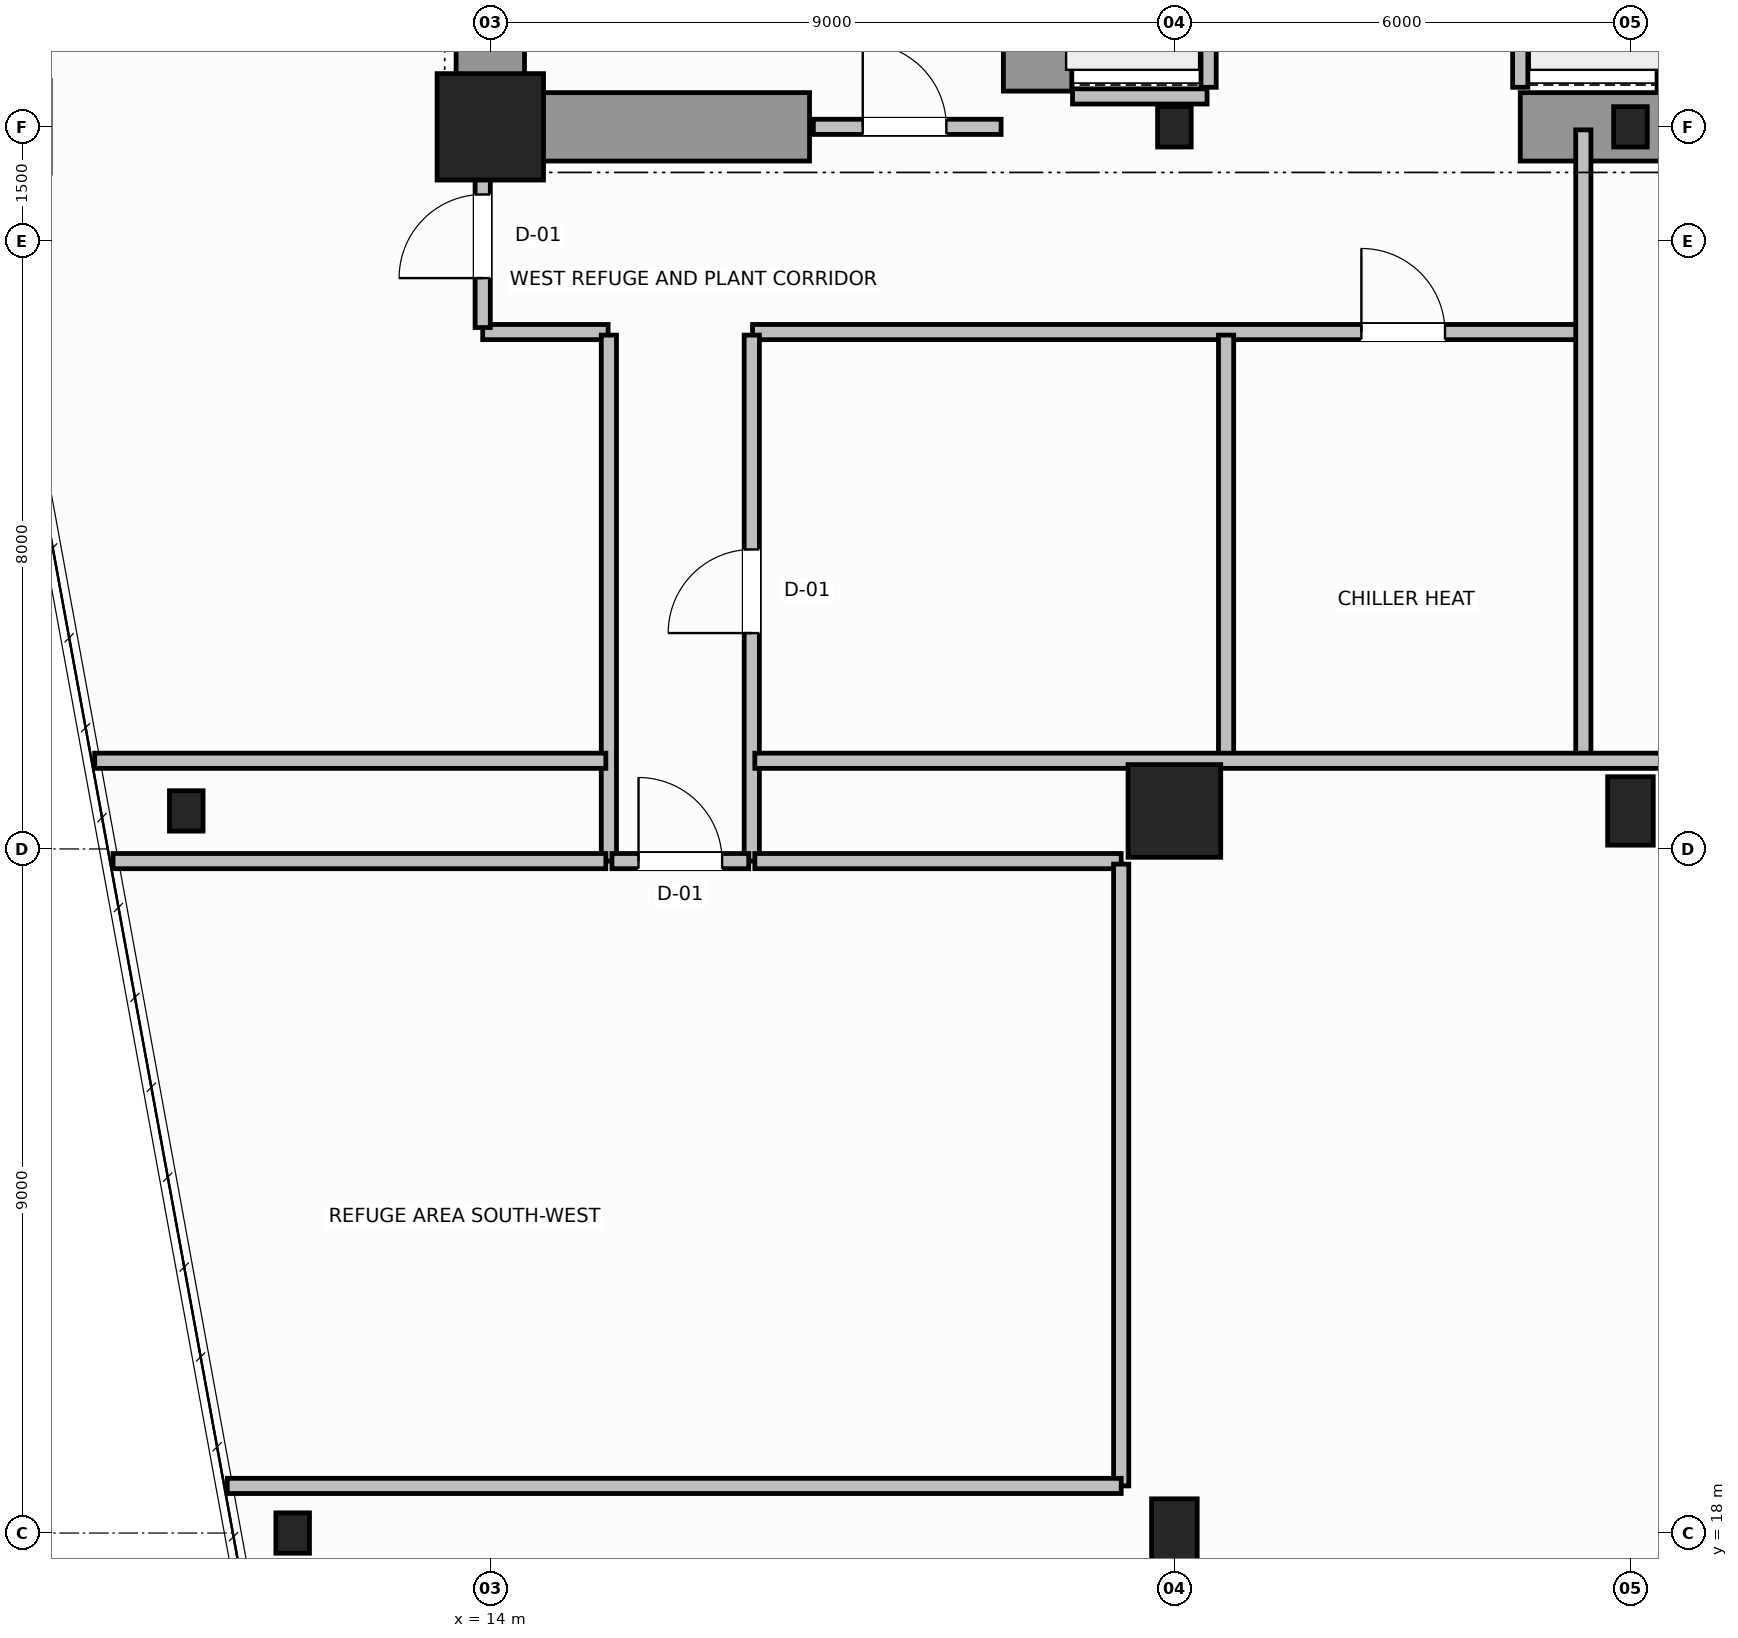
"""IFC4 building model, lengths in metres.
Left out: names, types, materials, properties, quantities, classifications, styles, units other than length and angle.
Written with IfcOpenShell. Run it as: python <this file> out.ifc"""

import sys

from ifc_helpers import new_model, si_unit, direction, frame, frame_2d, origin, origin_2d, place, context, subcontext, project, spatial, rectangle, hollow_rectangle, hollow_circle, i_section, extrude, source, transform, mapped, element, fill, save


model = new_model("IFC4")
c1 = context("Model", 3, precision=1e-05, world=origin(), true_north=direction((0.0, 1.0)))
c2 = subcontext(c1, "Body", "Model", "MODEL_VIEW")
j1 = project(units=[si_unit("LENGTHUNIT", "METRE"), si_unit("PLANEANGLEUNIT", "RADIAN")], contexts=[c1])
p1 = place(None, origin())
s1 = spatial("IfcSite", under=j1, at=p1, CompositionType="ELEMENT")
p2 = place(p1, origin())
s2 = spatial("IfcBuilding", under=s1, at=p2, CompositionType="ELEMENT")
p3 = place(p2, frame((0.0, 0.0, 83.4)))
s3 = spatial("IfcBuildingStorey", under=s2, at=p3, CompositionType="ELEMENT", Elevation=83.4)
m1 = source(origin(), c2, "Body", "SweptSolid", [
    extrude(rectangle(XDim=1.4, YDim=1.4, at=origin_2d()), origin(), (0.0, 0.0, 1.0), 4.8),
])
p4 = place(p3, frame((14.0, 36.5, 0.0), z_axis=(0.0, 0.0, 1.0), x_axis=(1.0, 0.0, 0.0)))
e1 = element("IfcColumn", 1, at=p4, inside=s3, PredefinedType="COLUMN", context=c2, shape_type="MappedRepresentation", body=[
    mapped(m1, transform((0.0, 0.0, 0.0), scale=1.0)),
])
m2 = source(origin(), c2, "Body", "SweptSolid", [
    extrude(i_section(OverallWidth=0.442, OverallDepth=0.531, WebThickness=0.065, FlangeThickness=0.076, FilletRadius=0.015, at=origin_2d()), origin(), (0.0, 0.0, 1.0), 4.8),
])
for number, where, z_axis, x_axis in (
    (2, (23.0, 36.5, 0.0), (0.0, 0.0, 1.0), (1.0, 0.0, 0.0)),
    (3, (29.0, 36.5, 0.0), (0.0, 0.0, 1.0), (1.0, 0.0, 0.0)),
):
    element("IfcColumn", number, at=place(p3, frame(where, z_axis=z_axis, x_axis=x_axis)), inside=s3, PredefinedType="COLUMN", context=c2, shape_type="MappedRepresentation", body=[
        mapped(m2, transform((0.0, 0.0, 0.0), scale=1.0)),
    ])
m3 = source(origin(), c2, "Body", "SweptSolid", [
    extrude(i_section(OverallWidth=0.442, OverallDepth=0.531, WebThickness=0.065, FlangeThickness=0.076, FilletRadius=0.015, at=origin_2d()), origin(), (0.0, 0.0, 1.0), 4.8),
])
for number, where, z_axis, x_axis in (
    (4, (10.0, 27.5, 0.0), (0.0, 0.0, 1.0), (1.0, 0.0, 0.0)),
    (5, (11.4, 18.0, 0.0), (0.0, 0.0, 1.0), (1.0, 0.0, 0.0)),
):
    element("IfcColumn", number, at=place(p3, frame(where, z_axis=z_axis, x_axis=x_axis)), inside=s3, PredefinedType="COLUMN", context=c2, shape_type="MappedRepresentation", body=[
        mapped(m3, transform((0.0, 0.0, 0.0), scale=1.0)),
    ])
m4 = source(origin(), c2, "Body", "SweptSolid", [
    extrude(hollow_circle(Radius=0.61, WallThickness=0.05, at=origin_2d()), origin(), (0.0, 0.0, 1.0), 4.8),
])
p5 = place(p3, frame((23.0, 27.5, 0.0), z_axis=(0.0, 0.0, 1.0), x_axis=(1.0, 0.0, 0.0)))
e6 = element("IfcColumn", 6, at=p5, inside=s3, PredefinedType="COLUMN", context=c2, shape_type="MappedRepresentation", body=[
    mapped(m4, transform((0.0, 0.0, 0.0), scale=1.0)),
])
m5 = source(origin(), c2, "Body", "SweptSolid", [
    extrude(hollow_rectangle(XDim=0.6, YDim=0.9, WallThickness=0.04, InnerFilletRadius=0.04, OuterFilletRadius=0.08, at=origin_2d()), origin(), (0.0, 0.0, 1.0), 4.8),
])
for number, where, z_axis, x_axis in (
    (7, (29.0, 27.5, 0.0), (0.0, 0.0, 1.0), (1.0, 0.0, 0.0)),
    (8, (23.0, 18.0, 0.0), (0.0, 0.0, 1.0), (1.0, 0.0, 0.0)),
):
    element("IfcColumn", number, at=place(p3, frame(where, z_axis=z_axis, x_axis=x_axis)), inside=s3, PredefinedType="COLUMN", context=c2, shape_type="MappedRepresentation", body=[
        mapped(m5, transform((0.0, 0.0, 0.0), scale=1.0)),
    ])
p6 = place(p3, frame((14.0, 36.5, 0.0), z_axis=(0.0, 0.0, 1.0), x_axis=(0.0, 1.0, 0.0)))
e9 = element("IfcWall", 9, at=p6, inside=s3, PredefinedType="SHEAR", context=c2, shape_type="SweptSolid", body=[
    extrude(rectangle(XDim=14.5, YDim=0.9, at=frame_2d((7.25, 0.0))), origin(), (0.0, 0.0, 1.0), 4.8),
])
p7 = place(p3, frame((14.47, 36.5, 0.0), z_axis=(0.0, 0.0, 1.0), x_axis=(1.0, 0.0, 0.0)))
e10 = element("IfcWall", 10, at=p7, inside=s3, PredefinedType="SHEAR", context=c2, shape_type="SweptSolid", body=[
    extrude(rectangle(XDim=3.73, YDim=0.9, at=frame_2d((1.865, 0.0))), origin(), (0.0, 0.0, 1.0), 3.34),
])
p8 = place(p3, frame((27.55, 36.5, 0.0), z_axis=(0.0, 0.0, 1.0), x_axis=(1.0, 0.0, 0.0)))
e11 = element("IfcWall", 11, at=p8, inside=s3, PredefinedType="SHEAR", context=c2, shape_type="SweptSolid", body=[
    extrude(rectangle(XDim=4.5, YDim=0.9, at=frame_2d((2.25, 0.0))), origin(), (0.0, 0.0, 1.0), 4.8),
])
p9 = place(p3, frame((21.2, 36.97, 0.0), z_axis=(0.0, 0.0, 1.0), x_axis=(0.0, 1.0, 0.0)))
e12 = element("IfcWall", 12, at=p9, inside=s3, PredefinedType="SHEAR", context=c2, shape_type="SweptSolid", body=[
    extrude(rectangle(XDim=9.23, YDim=0.9, at=frame_2d((4.615, 0.0))), origin(), (0.0, 0.0, 1.0), 4.8),
])
p10 = place(p3, frame((29.8, 36.97, 0.0), z_axis=(0.0, 0.0, 1.0), x_axis=(0.0, 1.0, 0.0)))
e13 = element("IfcWall", 13, at=p10, inside=s3, PredefinedType="SHEAR", context=c2, shape_type="SweptSolid", body=[
    extrude(rectangle(XDim=9.23, YDim=0.9, at=frame_2d((4.615, 0.0))), origin(), (0.0, 0.0, 1.0), 4.8),
])
p11 = place(p10, frame((4.05, 0.0, 0.0)))
e14 = element("IfcOpeningElement", 14, at=p11, cuts=e13, PredefinedType="OPENING", context=c2, shape_type="SweptSolid", body=[
    extrude(rectangle(XDim=1.1, YDim=2.15, at=frame_2d((0.55, 1.075))), frame((0.0, 0.46, 0.0), z_axis=(0.0, -1.0, 0.0), x_axis=(1.0, 0.0, 0.0)), (0.0, 0.0, 1.0), 0.92),
])
p12 = place(p3, frame((18.25, 36.5, 0.0), z_axis=(0.0, 0.0, 1.0), x_axis=(1.0, 0.0, 0.0)))
e15 = element("IfcWall", 15, at=p12, inside=s3, PredefinedType="SOLIDWALL", context=c2, shape_type="SweptSolid", body=[
    extrude(rectangle(XDim=2.47, YDim=0.2, at=frame_2d((1.235, 0.0))), origin(), (0.0, 0.0, 1.0), 3.33),
])
p13 = place(p12, frame((0.65, 0.0, 0.0)))
e16 = element("IfcOpeningElement", 16, at=p13, cuts=e15, PredefinedType="OPENING", context=c2, shape_type="SweptSolid", body=[
    extrude(rectangle(XDim=1.1, YDim=2.15, at=frame_2d((0.55, 1.075))), frame((0.0, 0.11, 0.0), z_axis=(0.0, -1.0, 0.0), x_axis=(1.0, 0.0, 0.0)), (0.0, 0.0, 1.0), 0.22),
])
p14 = place(p3, frame((21.66, 36.9, 0.0), z_axis=(0.0, 0.0, 1.0), x_axis=(1.0, 0.0, 0.0)))
e17 = element("IfcWall", 17, at=p14, inside=s3, PredefinedType="SOLIDWALL", context=c2, shape_type="SweptSolid", body=[
    extrude(rectangle(XDim=1.77, YDim=0.2, at=frame_2d((0.885, 0.0))), origin(), (0.0, 0.0, 1.0), 3.33),
])
for number, where, z_axis, x_axis in (
    (18, (23.45, 37.02, 0.0), (0.0, 0.0, 1.0), (0.0, 1.0, 0.0)),
    (19, (27.55, 37.02, 0.0), (0.0, 0.0, 1.0), (0.0, 1.0, 0.0)),
):
    element("IfcWall", number, at=place(p3, frame(where, z_axis=z_axis, x_axis=x_axis)), inside=s3, PredefinedType="SOLIDWALL", context=c2, shape_type="SweptSolid", body=[
        extrude(rectangle(XDim=2.56, YDim=0.2, at=frame_2d((1.28, 0.0))), origin(), (0.0, 0.0, 1.0), 4.54),
    ])
p15 = place(p3, frame((13.9, 33.8, 0.0), z_axis=(0.0, 0.0, 1.0), x_axis=(1.0, 0.0, 0.0)))
e20 = element("IfcWall", 20, at=p15, inside=s3, PredefinedType="SOLIDWALL", context=c2, shape_type="SweptSolid", body=[
    extrude(rectangle(XDim=1.65, YDim=0.2, at=frame_2d((0.825, 0.0))), origin(), (0.0, 0.0, 1.0), 4.03),
])
p16 = place(p3, frame((17.45, 33.8, 0.0), z_axis=(0.0, 0.0, 1.0), x_axis=(1.0, 0.0, 0.0)))
e21 = element("IfcWall", 21, at=p16, inside=s3, PredefinedType="SOLIDWALL", context=c2, shape_type="SweptSolid", body=[
    extrude(rectangle(XDim=10.91, YDim=0.2, at=frame_2d((5.455, 0.0))), origin(), (0.0, 0.0, 1.0), 4.03),
])
p17 = place(p16, frame((8.01, 0.0, 0.0)))
e22 = element("IfcOpeningElement", 22, at=p17, cuts=e21, PredefinedType="OPENING", context=c2, shape_type="SweptSolid", body=[
    extrude(rectangle(XDim=1.1, YDim=2.15, at=frame_2d((0.55, 1.075))), frame((0.0, 0.11, 0.0), z_axis=(0.0, -1.0, 0.0), x_axis=(1.0, 0.0, 0.0)), (0.0, 0.0, 1.0), 0.22),
])
p18 = place(p3, frame((13.9, 33.86, 0.0), z_axis=(0.0, 0.0, 1.0), x_axis=(0.0, 1.0, 0.0)))
e23 = element("IfcWall", 23, at=p18, inside=s3, PredefinedType="SOLIDWALL", context=c2, shape_type="SweptSolid", body=[
    extrude(rectangle(XDim=2.58, YDim=0.2, at=frame_2d((1.29, 0.0))), origin(), (0.0, 0.0, 1.0), 4.54),
])
p19 = place(p18, frame((0.65, 0.0, 0.0)))
e24 = element("IfcOpeningElement", 24, at=p19, cuts=e23, PredefinedType="OPENING", context=c2, shape_type="SweptSolid", body=[
    extrude(rectangle(XDim=1.1, YDim=2.15, at=frame_2d((0.55, 1.075))), frame((0.0, 0.11, 0.0), z_axis=(0.0, -1.0, 0.0), x_axis=(1.0, 0.0, 0.0)), (0.0, 0.0, 1.0), 0.22),
])
p20 = place(p3, frame((15.56, 26.84, 0.0), z_axis=(0.0, 0.0, 1.0), x_axis=(0.0, 1.0, 0.0)))
e25 = element("IfcWall", 25, at=p20, inside=s3, PredefinedType="SOLIDWALL", context=c2, shape_type="SweptSolid", body=[
    extrude(rectangle(XDim=6.92, YDim=0.2, at=frame_2d((3.46, 0.0))), origin(), (0.0, 0.0, 1.0), 4.54),
])
p21 = place(p3, frame((17.44, 26.84, 0.0), z_axis=(0.0, 0.0, 1.0), x_axis=(0.0, 1.0, 0.0)))
e26 = element("IfcWall", 26, at=p21, inside=s3, PredefinedType="SOLIDWALL", context=c2, shape_type="SweptSolid", body=[
    extrude(rectangle(XDim=6.92, YDim=0.2, at=frame_2d((3.46, 0.0))), origin(), (0.0, 0.0, 1.0), 4.54),
])
p22 = place(p21, frame((3.0, 0.0, 0.0)))
e27 = element("IfcOpeningElement", 27, at=p22, cuts=e26, PredefinedType="OPENING", context=c2, shape_type="SweptSolid", body=[
    extrude(rectangle(XDim=1.1, YDim=2.15, at=frame_2d((0.55, 1.075))), frame((0.0, 0.11, 0.0), z_axis=(0.0, -1.0, 0.0), x_axis=(1.0, 0.0, 0.0)), (0.0, 0.0, 1.0), 0.22),
])
p23 = place(p3, frame((15.6, 26.84, 0.0), z_axis=(0.0, 0.0, 1.0), x_axis=(1.0, 0.0, 0.0)))
e28 = element("IfcWall", 28, at=p23, inside=s3, PredefinedType="SOLIDWALL", context=c2, shape_type="SweptSolid", body=[
    extrude(rectangle(XDim=1.8, YDim=0.2, at=frame_2d((0.9, 0.0))), origin(), (0.0, 0.0, 1.0), 4.54),
])
p24 = place(p23, frame((0.35, 0.0, 0.0)))
e29 = element("IfcOpeningElement", 29, at=p24, cuts=e28, PredefinedType="OPENING", context=c2, shape_type="SweptSolid", body=[
    extrude(rectangle(XDim=1.1, YDim=2.15, at=frame_2d((0.55, 1.075))), frame((0.0, 0.11, 0.0), z_axis=(0.0, -1.0, 0.0), x_axis=(1.0, 0.0, 0.0)), (0.0, 0.0, 1.0), 0.22),
])
p25 = place(p3, frame((28.38, 28.16, 0.0), z_axis=(0.0, 0.0, 1.0), x_axis=(0.0, 1.0, 0.0)))
e30 = element("IfcWall", 30, at=p25, inside=s3, PredefinedType="SOLIDWALL", context=c2, shape_type="SweptSolid", body=[
    extrude(rectangle(XDim=8.3, YDim=0.2, at=frame_2d((4.15, 0.0))), origin(), (0.0, 0.0, 1.0), 4.54),
])
p26 = place(p3, frame((23.68, 28.16, 0.0), z_axis=(0.0, 0.0, 1.0), x_axis=(0.0, 1.0, 0.0)))
e31 = element("IfcWall", 31, at=p26, inside=s3, PredefinedType="SOLIDWALL", context=c2, shape_type="SweptSolid", body=[
    extrude(rectangle(XDim=5.6, YDim=0.2, at=frame_2d((2.8, 0.0))), origin(), (0.0, 0.0, 1.0), 4.54),
])
p27 = place(p3, frame((8.795, 28.16, 0.0), z_axis=(0.0, 0.0, 1.0), x_axis=(1.0, 0.0, 0.0)))
e32 = element("IfcWall", 32, at=p27, inside=s3, PredefinedType="SOLIDWALL", context=c2, shape_type="SweptSolid", body=[
    extrude(rectangle(XDim=6.725, YDim=0.2, at=frame_2d((3.362, 0.0))), origin(), (0.0, 0.0, 1.0), 4.54),
])
p28 = place(p3, frame((17.48, 28.16, 0.0), z_axis=(0.0, 0.0, 1.0), x_axis=(1.0, 0.0, 0.0)))
e33 = element("IfcWall", 33, at=p28, inside=s3, PredefinedType="SOLIDWALL", context=c2, shape_type="SweptSolid", body=[
    extrude(rectangle(XDim=33.04, YDim=0.2, at=frame_2d((16.52, 0.0))), origin(), (0.0, 0.0, 1.0), 4.54),
])
p29 = place(p3, frame((9.037, 26.84, 0.0), z_axis=(0.0, 0.0, 1.0), x_axis=(1.0, 0.0, 0.0)))
e34 = element("IfcWall", 34, at=p29, inside=s3, PredefinedType="SOLIDWALL", context=c2, shape_type="SweptSolid", body=[
    extrude(rectangle(XDim=6.483, YDim=0.2, at=frame_2d((3.242, 0.0))), origin(), (0.0, 0.0, 1.0), 4.54),
])
p30 = place(p3, frame((17.48, 26.84, 0.0), z_axis=(0.0, 0.0, 1.0), x_axis=(1.0, 0.0, 0.0)))
e35 = element("IfcWall", 35, at=p30, inside=s3, PredefinedType="SOLIDWALL", context=c2, shape_type="SweptSolid", body=[
    extrude(rectangle(XDim=4.82, YDim=0.2, at=frame_2d((2.41, 0.0))), origin(), (0.0, 0.0, 1.0), 4.54),
])
p31 = place(p3, frame((22.3, 18.62, 0.0), z_axis=(0.0, 0.0, 1.0), x_axis=(0.0, 1.0, 0.0)))
e36 = element("IfcWall", 36, at=p31, inside=s3, PredefinedType="SOLIDWALL", context=c2, shape_type="SweptSolid", body=[
    extrude(rectangle(XDim=8.18, YDim=0.2, at=frame_2d((4.09, 0.0))), origin(), (0.0, 0.0, 1.0), 4.54),
])
p32 = place(p3, frame((10.539, 18.62, 0.0), z_axis=(0.0, 0.0, 1.0), x_axis=(1.0, 0.0, 0.0)))
e37 = element("IfcWall", 37, at=p32, inside=s3, PredefinedType="SOLIDWALL", context=c2, shape_type="SweptSolid", body=[
    extrude(rectangle(XDim=11.761, YDim=0.2, at=frame_2d((5.88, 0.0))), origin(), (0.0, 0.0, 1.0), 4.54),
])
m6 = source(origin(), c2, "Body", "SweptSolid", [
    extrude(rectangle(XDim=1.1, YDim=2.15, at=frame_2d((0.55, 1.075))), frame((0.0, 0.025, 0.0), z_axis=(0.0, -1.0, 0.0), x_axis=(1.0, 0.0, 0.0)), (0.0, 0.0, 1.0), 0.05),
])
p33 = place(p13, origin())
e38 = element("IfcDoor", 38, at=p33, inside=s3, OperationType="SINGLE_SWING_RIGHT", PredefinedType="DOOR", context=c2, shape_type="MappedRepresentation", body=[
    mapped(m6, transform((0.0, 0.0, 0.0), scale=1.0)),
])
fill(e16, e38)
p34 = place(p19, origin())
e39 = element("IfcDoor", 39, at=p34, inside=s3, OperationType="SINGLE_SWING_LEFT", PredefinedType="DOOR", context=c2, shape_type="MappedRepresentation", body=[
    mapped(m6, transform((0.0, 0.0, 0.0), scale=1.0)),
])
fill(e24, e39)
p35 = place(p22, origin())
e40 = element("IfcDoor", 40, at=p35, inside=s3, OperationType="SINGLE_SWING_RIGHT", PredefinedType="DOOR", context=c2, shape_type="MappedRepresentation", body=[
    mapped(m6, transform((0.0, 0.0, 0.0), scale=1.0)),
])
fill(e27, e40)
p36 = place(p24, origin())
e41 = element("IfcDoor", 41, at=p36, inside=s3, OperationType="SINGLE_SWING_LEFT", PredefinedType="DOOR", context=c2, shape_type="MappedRepresentation", body=[
    mapped(m6, transform((0.0, 0.0, 0.0), scale=1.0)),
])
fill(e29, e41)
p37 = place(p17, origin())
e42 = element("IfcDoor", 42, at=p37, inside=s3, OperationType="SINGLE_SWING_LEFT", PredefinedType="DOOR", context=c2, shape_type="MappedRepresentation", body=[
    mapped(m6, transform((0.0, 0.0, 0.0), scale=1.0)),
])
fill(e22, e42)
save(model, sys.argv[1])
